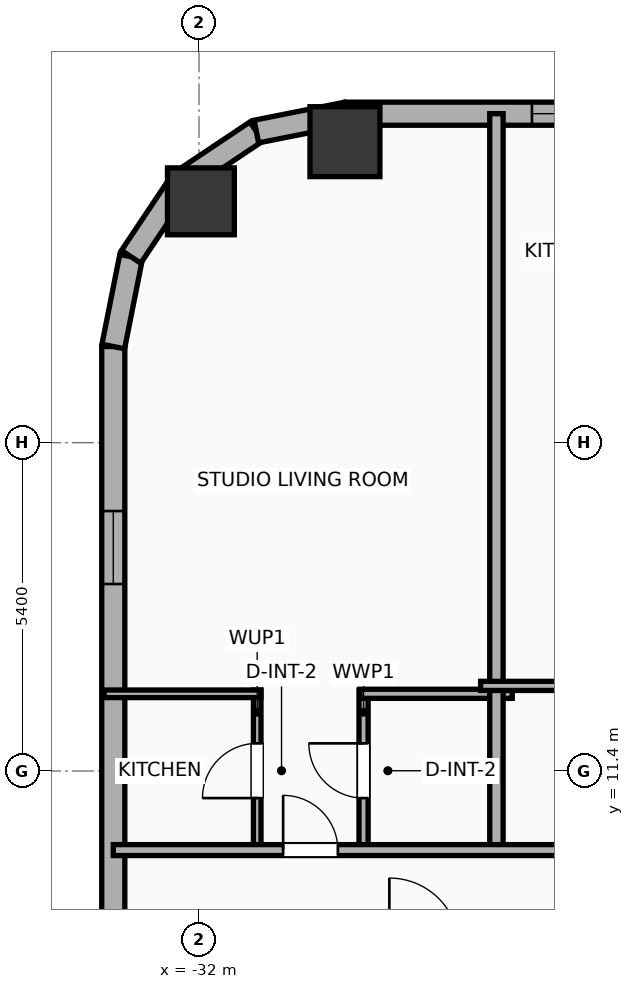
"""IFC4 building model, lengths in metres.
Left out: names, types, materials, properties, quantities, classifications, styles, units other than length and angle.
Written with IfcOpenShell. Run it as: python <this file> out.ifc"""

import sys

from ifc_helpers import new_model, si_unit, direction, frame, frame_2d, origin, origin_2d, place, context, subcontext, project, spatial, rectangle, hollow_rectangle, hollow_circle, extrude, element, fill, save


model = new_model("IFC4")
c1 = context("Model", 3, precision=1e-05, world=origin(), true_north=direction((0.0, 1.0)))
c2 = subcontext(c1, "Body", "Model", "MODEL_VIEW")
j1 = project(units=[si_unit("LENGTHUNIT", "METRE"), si_unit("PLANEANGLEUNIT", "RADIAN")], contexts=[c1])
p1 = place(None, origin())
s1 = spatial("IfcSite", under=j1, at=p1, CompositionType="ELEMENT")
p2 = place(p1, origin())
s2 = spatial("IfcBuilding", under=s1, at=p2, CompositionType="ELEMENT")
p3 = place(p2, frame((0.0, 0.0, 68.9)))
s3 = spatial("IfcBuildingStorey", under=s2, at=p3, CompositionType="ELEMENT", Elevation=68.9)
p4 = place(p3, frame((-29.6, 21.75, 0.0), z_axis=(0.0, 0.0, 1.0), x_axis=(1.0, 0.0, 0.0)))
e1 = element("IfcColumn", 1, at=p4, inside=s3, PredefinedType="COLUMN", context=c2, shape_type="SweptSolid", body=[
    extrude(hollow_rectangle(XDim=1.15, YDim=1.15, WallThickness=0.04, at=origin_2d()), origin(), (0.0, 0.0, 1.0), 3.9),
])
p5 = place(p3, frame((-31.969, 20.769, 0.0), z_axis=(0.0, 0.0, 1.0), x_axis=(1.0, 0.0, 0.0)))
e2 = element("IfcColumn", 2, at=p5, inside=s3, PredefinedType="COLUMN", context=c2, shape_type="SweptSolid", body=[
    extrude(hollow_circle(Radius=0.55, WallThickness=0.036, at=origin_2d()), origin(), (0.0, 0.0, 1.0), 3.9),
])
p6 = place(p3, frame((-33.41, -18.381, 0.0), z_axis=(0.0, 0.0, 1.0), x_axis=(0.0, 1.0, 0.0)))
e3 = element("IfcWall", 3, at=p6, inside=s3, PredefinedType="ELEMENTEDWALL", context=c2, shape_type="SweptSolid", body=[
    extrude(rectangle(XDim=36.763, YDim=0.38, at=frame_2d((18.381, 0.0))), origin(), (0.0, 0.0, 1.0), 3.65),
])
p7 = place(p6, frame((32.857, 0.0, 0.75)))
e4 = element("IfcOpeningElement", 4, at=p7, cuts=e3, PredefinedType="OPENING", context=c2, shape_type="SweptSolid", body=[
    extrude(rectangle(XDim=1.2, YDim=2.05, at=frame_2d((0.6, 1.025))), frame((0.0, 0.2, 0.0), z_axis=(0.0, -1.0, 0.0), x_axis=(1.0, 0.0, 0.0)), (0.0, 0.0, 1.0), 0.4),
])
p8 = place(p6, frame((22.126, 0.0, 0.75)))
e5 = element("IfcOpeningElement", 5, at=p8, cuts=e3, PredefinedType="OPENING", context=c2, shape_type="SweptSolid", body=[
    extrude(rectangle(XDim=1.2, YDim=2.05, at=frame_2d((0.6, 1.025))), frame((0.0, 0.2, 0.0), z_axis=(0.0, -1.0, 0.0), x_axis=(1.0, 0.0, 0.0)), (0.0, 0.0, 1.0), 0.4),
])
p9 = place(p6, frame((13.576, 0.0, 0.75)))
e6 = element("IfcOpeningElement", 6, at=p9, cuts=e3, PredefinedType="OPENING", context=c2, shape_type="SweptSolid", body=[
    extrude(rectangle(XDim=1.2, YDim=2.05, at=frame_2d((0.6, 1.025))), frame((0.0, 0.2, 0.0), z_axis=(0.0, -1.0, 0.0), x_axis=(1.0, 0.0, 0.0)), (0.0, 0.0, 1.0), 0.4),
])
p10 = place(p3, frame((-33.41, 18.381, 0.0), z_axis=(0.0, 0.0, 1.0), x_axis=(0.195086038585, 0.980786132421, 0.0)))
e7 = element("IfcWall", 7, at=p10, inside=s3, PredefinedType="ELEMENTEDWALL", context=c2, shape_type="SweptSolid", body=[
    extrude(rectangle(XDim=1.504, YDim=0.38, at=frame_2d((0.752, 0.0))), origin(), (0.0, 0.0, 1.0), 3.65),
])
p11 = place(p3, frame((-33.116, 19.857, 0.0), z_axis=(0.0, 0.0, 1.0), x_axis=(0.555572577804, 0.831468045563, 0.0)))
e8 = element("IfcWall", 8, at=p11, inside=s3, PredefinedType="ELEMENTEDWALL", context=c2, shape_type="SweptSolid", body=[
    extrude(rectangle(XDim=1.485, YDim=0.38, at=frame_2d((0.742, 0.0))), origin(), (0.0, 0.0, 1.0), 3.65),
])
p12 = place(p3, frame((-32.292, 21.091, 0.0), z_axis=(0.0, 0.0, 1.0), x_axis=(0.831442848281, 0.555610286119, 0.0)))
e9 = element("IfcWall", 9, at=p12, inside=s3, PredefinedType="ELEMENTEDWALL", context=c2, shape_type="SweptSolid", body=[
    extrude(rectangle(XDim=1.485, YDim=0.38, at=frame_2d((0.743, 0.0))), origin(), (0.0, 0.0, 1.0), 3.65),
])
p13 = place(p3, frame((-31.057, 21.917, 0.0), z_axis=(0.0, 0.0, 1.0), x_axis=(0.980786132421, 0.195086038585, 0.0)))
e10 = element("IfcWall", 10, at=p13, inside=s3, PredefinedType="ELEMENTEDWALL", context=c2, shape_type="SweptSolid", body=[
    extrude(rectangle(XDim=1.504, YDim=0.38, at=frame_2d((0.752, 0.0))), origin(), (0.0, 0.0, 1.0), 3.65),
])
p14 = place(p3, frame((-29.581, 22.21, 0.0), z_axis=(0.0, 0.0, 1.0), x_axis=(1.0, 0.0, 0.0)))
e11 = element("IfcWall", 11, at=p14, inside=s3, PredefinedType="ELEMENTEDWALL", context=c2, shape_type="SweptSolid", body=[
    extrude(rectangle(XDim=51.963, YDim=0.38, at=frame_2d((25.981, 0.0))), origin(), (0.0, 0.0, 1.0), 3.65),
])
p15 = place(p14, frame((5.81, 0.0, 0.75)))
e12 = element("IfcOpeningElement", 12, at=p15, cuts=e11, PredefinedType="OPENING", context=c2, shape_type="SweptSolid", body=[
    extrude(rectangle(XDim=2.4, YDim=2.1, at=frame_2d((1.2, 1.05))), frame((0.0, 0.2, 0.0), z_axis=(0.0, -1.0, 0.0), x_axis=(1.0, 0.0, 0.0)), (0.0, 0.0, 1.0), 0.4),
])
p16 = place(p14, frame((23.931, 0.0, 0.75)))
e13 = element("IfcOpeningElement", 13, at=p16, cuts=e11, PredefinedType="OPENING", context=c2, shape_type="SweptSolid", body=[
    extrude(rectangle(XDim=2.4, YDim=2.1, at=frame_2d((1.2, 1.05))), frame((0.0, 0.2, 0.0), z_axis=(0.0, -1.0, 0.0), x_axis=(1.0, 0.0, 0.0)), (0.0, 0.0, 1.0), 0.4),
])
p17 = place(p14, frame((3.056, 0.0, 0.75)))
e14 = element("IfcOpeningElement", 14, at=p17, cuts=e11, PredefinedType="OPENING", context=c2, shape_type="SweptSolid", body=[
    extrude(rectangle(XDim=1.2, YDim=2.05, at=frame_2d((0.6, 1.025))), frame((0.0, 0.2, 0.0), z_axis=(0.0, -1.0, 0.0), x_axis=(1.0, 0.0, 0.0)), (0.0, 0.0, 1.0), 0.4),
])
p18 = place(p14, frame((11.127, 0.0, 0.75)))
e15 = element("IfcOpeningElement", 15, at=p18, cuts=e11, PredefinedType="OPENING", context=c2, shape_type="SweptSolid", body=[
    extrude(rectangle(XDim=0.52, YDim=2.05, at=frame_2d((0.26, 1.025))), frame((0.0, 0.2, 0.0), z_axis=(0.0, -1.0, 0.0), x_axis=(1.0, 0.0, 0.0)), (0.0, 0.0, 1.0), 0.4),
])
p19 = place(p14, frame((14.327, 0.0, 0.75)))
e16 = element("IfcOpeningElement", 16, at=p19, cuts=e11, PredefinedType="OPENING", context=c2, shape_type="SweptSolid", body=[
    extrude(rectangle(XDim=1.2, YDim=2.05, at=frame_2d((0.6, 1.025))), frame((0.0, 0.2, 0.0), z_axis=(0.0, -1.0, 0.0), x_axis=(1.0, 0.0, 0.0)), (0.0, 0.0, 1.0), 0.4),
])
p20 = place(p14, frame((21.641, 0.0, 0.75)))
e17 = element("IfcOpeningElement", 17, at=p20, cuts=e11, PredefinedType="OPENING", context=c2, shape_type="SweptSolid", body=[
    extrude(rectangle(XDim=1.2, YDim=2.05, at=frame_2d((0.6, 1.025))), frame((0.0, 0.2, 0.0), z_axis=(0.0, -1.0, 0.0), x_axis=(1.0, 0.0, 0.0)), (0.0, 0.0, 1.0), 0.4),
])
p21 = place(p14, frame((18.486, 0.0, 0.75)))
e18 = element("IfcOpeningElement", 18, at=p21, cuts=e11, PredefinedType="OPENING", context=c2, shape_type="SweptSolid", body=[
    extrude(rectangle(XDim=1.2, YDim=2.05, at=frame_2d((0.6, 1.025))), frame((0.0, 0.2, 0.0), z_axis=(0.0, -1.0, 0.0), x_axis=(1.0, 0.0, 0.0)), (0.0, 0.0, 1.0), 0.4),
])
p22 = place(p14, frame((28.976, 0.0, 0.75)))
e19 = element("IfcOpeningElement", 19, at=p22, cuts=e11, PredefinedType="OPENING", context=c2, shape_type="SweptSolid", body=[
    extrude(rectangle(XDim=1.2, YDim=2.05, at=frame_2d((0.6, 1.025))), frame((0.0, 0.2, 0.0), z_axis=(0.0, -1.0, 0.0), x_axis=(1.0, 0.0, 0.0)), (0.0, 0.0, 1.0), 0.4),
])
p23 = place(p14, frame((33.476, 0.0, 0.75)))
e20 = element("IfcOpeningElement", 20, at=p23, cuts=e11, PredefinedType="OPENING", context=c2, shape_type="SweptSolid", body=[
    extrude(rectangle(XDim=1.2, YDim=2.05, at=frame_2d((0.6, 1.025))), frame((0.0, 0.2, 0.0), z_axis=(0.0, -1.0, 0.0), x_axis=(1.0, 0.0, 0.0)), (0.0, 0.0, 1.0), 0.4),
])
p24 = place(p14, frame((36.752, 0.0, 0.75)))
e21 = element("IfcOpeningElement", 21, at=p24, cuts=e11, PredefinedType="OPENING", context=c2, shape_type="SweptSolid", body=[
    extrude(rectangle(XDim=1.2, YDim=2.05, at=frame_2d((0.6, 1.025))), frame((0.0, 0.2, 0.0), z_axis=(0.0, -1.0, 0.0), x_axis=(1.0, 0.0, 0.0)), (0.0, 0.0, 1.0), 0.4),
])
p25 = place(p14, frame((42.452, 0.0, 0.75)))
e22 = element("IfcOpeningElement", 22, at=p25, cuts=e11, PredefinedType="OPENING", context=c2, shape_type="SweptSolid", body=[
    extrude(rectangle(XDim=1.2, YDim=2.05, at=frame_2d((0.6, 1.025))), frame((0.0, 0.2, 0.0), z_axis=(0.0, -1.0, 0.0), x_axis=(1.0, 0.0, 0.0)), (0.0, 0.0, 1.0), 0.4),
])
p26 = place(p14, frame((45.831, 0.0, 0.75)))
e23 = element("IfcOpeningElement", 23, at=p26, cuts=e11, PredefinedType="OPENING", context=c2, shape_type="SweptSolid", body=[
    extrude(rectangle(XDim=1.2, YDim=2.05, at=frame_2d((0.6, 1.025))), frame((0.0, 0.2, 0.0), z_axis=(0.0, -1.0, 0.0), x_axis=(1.0, 0.0, 0.0)), (0.0, 0.0, 1.0), 0.4),
])
p27 = place(p14, frame((48.585, 0.0, 0.75)))
e24 = element("IfcOpeningElement", 24, at=p27, cuts=e11, PredefinedType="OPENING", context=c2, shape_type="SweptSolid", body=[
    extrude(rectangle(XDim=1.2, YDim=2.05, at=frame_2d((0.6, 1.025))), frame((0.0, 0.2, 0.0), z_axis=(0.0, -1.0, 0.0), x_axis=(1.0, 0.0, 0.0)), (0.0, 0.0, 1.0), 0.4),
])
p28 = place(p14, frame((50.421, 0.0, 0.75)))
e25 = element("IfcOpeningElement", 25, at=p28, cuts=e11, PredefinedType="OPENING", context=c2, shape_type="SweptSolid", body=[
    extrude(rectangle(XDim=0.52, YDim=2.05, at=frame_2d((0.26, 1.025))), frame((0.0, 0.2, 0.0), z_axis=(0.0, -1.0, 0.0), x_axis=(1.0, 0.0, 0.0)), (0.0, 0.0, 1.0), 0.4),
])
p29 = place(p3, frame((-31.043, 10.08, 0.0), z_axis=(0.0, 0.0, 1.0), x_axis=(0.0, 1.0, 0.0)))
e26 = element("IfcWall", 26, at=p29, inside=s3, PredefinedType="PARTITIONING", context=c2, shape_type="SweptSolid", body=[
    extrude(rectangle(XDim=2.65, YDim=0.125, at=frame_2d((1.325, 0.0))), origin(), (0.0, 0.0, 1.0), 3.65),
])
p30 = place(p29, frame((0.875, 0.0, 0.0)))
e27 = element("IfcOpeningElement", 27, at=p30, cuts=e26, PredefinedType="OPENING", context=c2, shape_type="SweptSolid", body=[
    extrude(rectangle(XDim=0.9, YDim=2.05, at=frame_2d((0.45, 1.025))), frame((0.0, 0.073, 0.0), z_axis=(0.0, -1.0, 0.0), x_axis=(1.0, 0.0, 0.0)), (0.0, 0.0, 1.0), 0.145),
])
p31 = place(p3, frame((-29.294, 10.08, 0.0), z_axis=(0.0, 0.0, 1.0), x_axis=(0.0, 1.0, 0.0)))
e28 = element("IfcWall", 28, at=p31, inside=s3, PredefinedType="PLUMBINGWALL", context=c2, shape_type="SweptSolid", body=[
    extrude(rectangle(XDim=2.65, YDim=0.15, at=frame_2d((1.325, 0.0))), origin(), (0.0, 0.0, 1.0), 3.65),
])
p32 = place(p31, frame((0.875, 0.0, 0.0)))
e29 = element("IfcOpeningElement", 29, at=p32, cuts=e28, PredefinedType="OPENING", context=c2, shape_type="SweptSolid", body=[
    extrude(rectangle(XDim=0.9, YDim=2.05, at=frame_2d((0.45, 1.025))), frame((0.0, 0.085, 0.0), z_axis=(0.0, -1.0, 0.0), x_axis=(1.0, 0.0, 0.0)), (0.0, 0.0, 1.0), 0.17),
])
p33 = place(p3, frame((-33.56, 12.67, 0.0), z_axis=(0.0, 0.0, 1.0), x_axis=(1.0, 0.0, 0.0)))
e30 = element("IfcWall", 30, at=p33, inside=s3, PredefinedType="PARTITIONING", context=c2, shape_type="SweptSolid", body=[
    extrude(rectangle(XDim=2.577, YDim=0.125, at=frame_2d((1.289, 0.0))), origin(), (0.0, 0.0, 1.0), 3.65),
])
p34 = place(p3, frame((-29.354, 12.67, 0.0), z_axis=(0.0, 0.0, 1.0), x_axis=(1.0, 0.0, 0.0)))
e31 = element("IfcWall", 31, at=p34, inside=s3, PredefinedType="PLUMBINGWALL", context=c2, shape_type="SweptSolid", body=[
    extrude(rectangle(XDim=2.505, YDim=0.15, at=frame_2d((1.252, 0.0))), origin(), (0.0, 0.0, 1.0), 3.65),
])
p35 = place(p3, frame((-27.109, 10.02, 0.0), z_axis=(0.0, 0.0, 1.0), x_axis=(0.0, 1.0, 0.0)))
e32 = element("IfcWall", 32, at=p35, inside=s3, PredefinedType="PARTITIONING", context=c2, shape_type="SweptSolid", body=[
    extrude(rectangle(XDim=12.19, YDim=0.22, at=frame_2d((6.095, 0.0))), origin(), (0.0, 0.0, 1.0), 3.65),
])
p36 = place(p3, frame((-27.369, 12.8, 0.0), z_axis=(0.0, 0.0, 1.0), x_axis=(1.0, 0.0, 0.0)))
e33 = element("IfcWall", 33, at=p36, inside=s3, PredefinedType="PLUMBINGWALL", context=c2, shape_type="SweptSolid", body=[
    extrude(rectangle(XDim=2.708, YDim=0.15, at=frame_2d((1.354, 0.0))), origin(), (0.0, 0.0, 1.0), 3.65),
])
p37 = place(p3, frame((-33.41, 10.1, 0.0), z_axis=(0.0, 0.0, 1.0), x_axis=(1.0, 0.0, 0.0)))
e34 = element("IfcWall", 34, at=p37, inside=s3, PredefinedType="PARTITIONING", context=c2, shape_type="SweptSolid", body=[
    extrude(rectangle(XDim=59.62, YDim=0.18, at=frame_2d((29.81, 0.0))), origin(), (0.0, 0.0, 1.0), 3.65),
])
p38 = place(p37, frame((2.793, 0.0, 0.0)))
e35 = element("IfcOpeningElement", 35, at=p38, cuts=e34, PredefinedType="OPENING", context=c2, shape_type="SweptSolid", body=[
    extrude(rectangle(XDim=0.9, YDim=2.05, at=frame_2d((0.45, 1.025))), frame((0.0, 0.1, 0.0), z_axis=(0.0, -1.0, 0.0), x_axis=(1.0, 0.0, 0.0)), (0.0, 0.0, 1.0), 0.2),
])
p39 = place(p37, frame((10.037, 0.0, 0.0)))
e36 = element("IfcOpeningElement", 36, at=p39, cuts=e34, PredefinedType="OPENING", context=c2, shape_type="SweptSolid", body=[
    extrude(rectangle(XDim=1.15, YDim=2.05, at=frame_2d((0.575, 1.025))), frame((0.0, 0.1, 0.0), z_axis=(0.0, -1.0, 0.0), x_axis=(1.0, 0.0, 0.0)), (0.0, 0.0, 1.0), 0.2),
])
p40 = place(p37, frame((16.882, 0.0, 0.0)))
e37 = element("IfcOpeningElement", 37, at=p40, cuts=e34, PredefinedType="OPENING", context=c2, shape_type="SweptSolid", body=[
    extrude(rectangle(XDim=1.15, YDim=2.05, at=frame_2d((0.575, 1.025))), frame((0.0, 0.1, 0.0), z_axis=(0.0, -1.0, 0.0), x_axis=(1.0, 0.0, 0.0)), (0.0, 0.0, 1.0), 0.2),
])
p41 = place(p37, frame((25.801, 0.0, 0.0)))
e38 = element("IfcOpeningElement", 38, at=p41, cuts=e34, PredefinedType="OPENING", context=c2, shape_type="SweptSolid", body=[
    extrude(rectangle(XDim=1.15, YDim=2.05, at=frame_2d((0.575, 1.025))), frame((0.0, 0.1, 0.0), z_axis=(0.0, -1.0, 0.0), x_axis=(1.0, 0.0, 0.0)), (0.0, 0.0, 1.0), 0.2),
])
p42 = place(p37, frame((34.72, 0.0, 0.0)))
e39 = element("IfcOpeningElement", 39, at=p42, cuts=e34, PredefinedType="OPENING", context=c2, shape_type="SweptSolid", body=[
    extrude(rectangle(XDim=1.15, YDim=2.05, at=frame_2d((0.575, 1.025))), frame((0.0, 0.1, 0.0), z_axis=(0.0, -1.0, 0.0), x_axis=(1.0, 0.0, 0.0)), (0.0, 0.0, 1.0), 0.2),
])
p43 = place(p37, frame((43.771, 0.0, 0.0)))
e40 = element("IfcOpeningElement", 40, at=p43, cuts=e34, PredefinedType="OPENING", context=c2, shape_type="SweptSolid", body=[
    extrude(rectangle(XDim=1.15, YDim=2.05, at=frame_2d((0.575, 1.025))), frame((0.0, 0.1, 0.0), z_axis=(0.0, -1.0, 0.0), x_axis=(1.0, 0.0, 0.0)), (0.0, 0.0, 1.0), 0.2),
])
p44 = place(p37, frame((49.715, 0.0, 0.0)))
e41 = element("IfcOpeningElement", 41, at=p44, cuts=e34, PredefinedType="OPENING", context=c2, shape_type="SweptSolid", body=[
    extrude(rectangle(XDim=1.15, YDim=2.05, at=frame_2d((0.575, 1.025))), frame((0.0, 0.1, 0.0), z_axis=(0.0, -1.0, 0.0), x_axis=(1.0, 0.0, 0.0)), (0.0, 0.0, 1.0), 0.2),
])
p45 = place(p37, frame((56.654, 0.0, 0.0)))
e42 = element("IfcOpeningElement", 42, at=p45, cuts=e34, PredefinedType="OPENING", context=c2, shape_type="SweptSolid", body=[
    extrude(rectangle(XDim=0.9, YDim=2.05, at=frame_2d((0.45, 1.025))), frame((0.0, 0.1, 0.0), z_axis=(0.0, -1.0, 0.0), x_axis=(1.0, 0.0, 0.0)), (0.0, 0.0, 1.0), 0.2),
])
p46 = place(p7, origin())
e43 = element("IfcWindow", 43, at=p46, inside=s3, PartitioningType="SINGLE_PANEL", PredefinedType="WINDOW", context=c2, shape_type="SweptSolid", body=[
    extrude(rectangle(XDim=1.2, YDim=2.05, at=frame_2d((0.6, 1.025))), frame((0.0, 0.03, 0.0), z_axis=(0.0, -1.0, 0.0), x_axis=(1.0, 0.0, 0.0)), (0.0, 0.0, 1.0), 0.06),
])
fill(e4, e43)
p47 = place(p17, origin())
e44 = element("IfcWindow", 44, at=p47, inside=s3, PartitioningType="SINGLE_PANEL", PredefinedType="WINDOW", context=c2, shape_type="SweptSolid", body=[
    extrude(rectangle(XDim=1.2, YDim=2.05, at=frame_2d((0.6, 1.025))), frame((0.0, 0.03, 0.0), z_axis=(0.0, -1.0, 0.0), x_axis=(1.0, 0.0, 0.0)), (0.0, 0.0, 1.0), 0.06),
])
fill(e14, e44)
p48 = place(p30, origin())
e45 = element("IfcDoor", 45, at=p48, inside=s3, OperationType="SINGLE_SWING_LEFT", PredefinedType="DOOR", context=c2, shape_type="SweptSolid", body=[
    extrude(rectangle(XDim=0.9, YDim=2.05, at=frame_2d((0.45, 1.025))), frame((0.0, 0.025, 0.0), z_axis=(0.0, -1.0, 0.0), x_axis=(1.0, 0.0, 0.0)), (0.0, 0.0, 1.0), 0.05),
])
fill(e27, e45)
p49 = place(p32, origin())
e46 = element("IfcDoor", 46, at=p49, inside=s3, OperationType="SINGLE_SWING_RIGHT", PredefinedType="DOOR", context=c2, shape_type="SweptSolid", body=[
    extrude(rectangle(XDim=0.9, YDim=2.05, at=frame_2d((0.45, 1.025))), frame((0.0, 0.025, 0.0), z_axis=(0.0, -1.0, 0.0), x_axis=(1.0, 0.0, 0.0)), (0.0, 0.0, 1.0), 0.05),
])
fill(e29, e46)
p50 = place(p38, origin())
e47 = element("IfcDoor", 47, at=p50, inside=s3, OperationType="SINGLE_SWING_LEFT", PredefinedType="DOOR", context=c2, shape_type="SweptSolid", body=[
    extrude(rectangle(XDim=0.9, YDim=2.05, at=frame_2d((0.45, 1.025))), frame((0.0, 0.025, 0.0), z_axis=(0.0, -1.0, 0.0), x_axis=(1.0, 0.0, 0.0)), (0.0, 0.0, 1.0), 0.05),
])
fill(e35, e47)
save(model, sys.argv[1])
